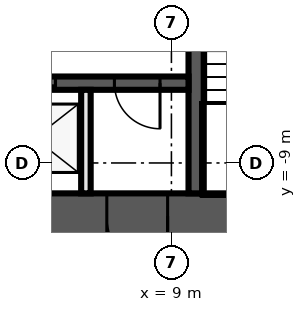
"""IFC4 building model, lengths in metres.
Left out: names, types, materials, properties, quantities, classifications, styles, units other than length and angle.
Written with IfcOpenShell. Run it as: python <this file> out.ifc"""

import sys

from ifc_helpers import new_model, si_unit, direction, frame, frame_2d, origin, place, context, subcontext, project, spatial, rectangle, extrude, element, fill, save


model = new_model("IFC4")
c1 = context("Model", 3, precision=1e-05, world=origin(), true_north=direction((0.0, 1.0)))
c2 = subcontext(c1, "Body", "Model", "MODEL_VIEW")
j1 = project(units=[si_unit("LENGTHUNIT", "METRE"), si_unit("PLANEANGLEUNIT", "RADIAN")], contexts=[c1])
p1 = place(None, origin())
s1 = spatial("IfcSite", under=j1, at=p1, CompositionType="ELEMENT")
p2 = place(p1, origin())
s2 = spatial("IfcBuilding", under=s1, at=p2, CompositionType="ELEMENT")
p3 = place(p2, origin())
s3 = spatial("IfcBuildingStorey", under=s2, at=p3, CompositionType="ELEMENT", Elevation=0.0)
p4 = place(p3, frame((14.0, -10.4, 0.0), z_axis=(0.0, 0.0, 1.0), x_axis=(-1.0, 0.0, 0.0)))
e1 = element("IfcWall", 1, at=p4, inside=s3, PredefinedType="SHEAR", context=c2, shape_type="SweptSolid", body=[
    extrude(rectangle(XDim=28.0, YDim=1.2, at=frame_2d((14.0, 0.0))), origin(), (0.0, 0.0, 1.0), 8.55),
])
p5 = place(p4, frame((5.1, 0.0, 0.0)))
e2 = element("IfcOpeningElement", 2, at=p5, cuts=e1, PredefinedType="OPENING", context=c2, shape_type="SweptSolid", body=[
    extrude(rectangle(XDim=1.6, YDim=2.1, at=frame_2d((0.8, 1.05))), frame((0.0, 0.61, 0.0), z_axis=(0.0, -1.0, 0.0), x_axis=(1.0, 0.0, 0.0)), (0.0, 0.0, 1.0), 1.22),
])
p6 = place(p3, frame((9.65, -2.3, 0.0), z_axis=(0.0, 0.0, 1.0), x_axis=(0.0, -1.0, 0.0)))
e3 = element("IfcWall", 3, at=p6, inside=s3, PredefinedType="SHEAR", context=c2, shape_type="SweptSolid", body=[
    extrude(rectangle(XDim=7.5, YDim=0.4, at=frame_2d((3.75, 0.0))), origin(), (0.0, 0.0, 1.0), 8.55),
])
p7 = place(p6, frame((1.2, 0.0, 0.0)))
e4 = element("IfcOpeningElement", 4, at=p7, cuts=e3, PredefinedType="OPENING", context=c2, shape_type="SweptSolid", body=[
    extrude(rectangle(XDim=1.2, YDim=2.1, at=frame_2d((0.6, 1.05))), frame((0.0, 0.21, 0.0), z_axis=(0.0, -1.0, 0.0), x_axis=(1.0, 0.0, 0.0)), (0.0, 0.0, 1.0), 0.42),
])
p8 = place(p3, frame((9.45, -6.9, 0.0), z_axis=(0.0, 0.0, 1.0), x_axis=(-1.0, 0.0, 0.0)))
e5 = element("IfcWall", 5, at=p8, inside=s3, PredefinedType="SHEAR", context=c2, shape_type="SweptSolid", body=[
    extrude(rectangle(XDim=18.9, YDim=0.35, at=frame_2d((9.45, 0.0))), origin(), (0.0, 0.0, 1.0), 8.55),
])
p9 = place(p8, frame((6.2, 0.0, 0.0)))
e6 = element("IfcOpeningElement", 6, at=p9, cuts=e5, PredefinedType="OPENING", context=c2, shape_type="SweptSolid", body=[
    extrude(rectangle(XDim=1.1, YDim=2.1, at=frame_2d((0.55, 1.05))), frame((0.0, 0.185, 0.0), z_axis=(0.0, -1.0, 0.0), x_axis=(1.0, 0.0, 0.0)), (0.0, 0.0, 1.0), 0.37),
])
p10 = place(p8, frame((3.5, 0.0, 0.0)))
e7 = element("IfcOpeningElement", 7, at=p10, cuts=e5, PredefinedType="OPENING", context=c2, shape_type="SweptSolid", body=[
    extrude(rectangle(XDim=1.1, YDim=2.1, at=frame_2d((0.55, 1.05))), frame((0.0, 0.185, 0.0), z_axis=(0.0, -1.0, 0.0), x_axis=(1.0, 0.0, 0.0)), (0.0, 0.0, 1.0), 0.37),
])
p11 = place(p8, frame((0.75, 0.0, 0.0)))
e8 = element("IfcOpeningElement", 8, at=p11, cuts=e5, PredefinedType="OPENING", context=c2, shape_type="SweptSolid", body=[
    extrude(rectangle(XDim=1.2, YDim=2.1, at=frame_2d((0.6, 1.05))), frame((0.0, 0.185, 0.0), z_axis=(0.0, -1.0, 0.0), x_axis=(1.0, 0.0, 0.0)), (0.0, 0.0, 1.0), 0.37),
])
p12 = place(p8, frame((17.1, 0.0, 0.0)))
e9 = element("IfcOpeningElement", 9, at=p12, cuts=e5, PredefinedType="OPENING", context=c2, shape_type="SweptSolid", body=[
    extrude(rectangle(XDim=0.9, YDim=2.1, at=frame_2d((0.45, 1.05))), frame((0.0, 0.185, 0.0), z_axis=(0.0, -1.0, 0.0), x_axis=(1.0, 0.0, 0.0)), (0.0, 0.0, 1.0), 0.37),
])
p13 = place(p8, frame((13.05, 0.0, 0.0)))
e10 = element("IfcOpeningElement", 10, at=p13, cuts=e5, PredefinedType="OPENING", context=c2, shape_type="SweptSolid", body=[
    extrude(rectangle(XDim=0.9, YDim=2.1, at=frame_2d((0.45, 1.05))), frame((0.0, 0.185, 0.0), z_axis=(0.0, -1.0, 0.0), x_axis=(1.0, 0.0, 0.0)), (0.0, 0.0, 1.0), 0.37),
])
p14 = place(p8, frame((9.0, 0.0, 0.0)))
e11 = element("IfcOpeningElement", 11, at=p14, cuts=e5, PredefinedType="OPENING", context=c2, shape_type="SweptSolid", body=[
    extrude(rectangle(XDim=0.9, YDim=2.1, at=frame_2d((0.45, 1.05))), frame((0.0, 0.185, 0.0), z_axis=(0.0, -1.0, 0.0), x_axis=(1.0, 0.0, 0.0)), (0.0, 0.0, 1.0), 0.37),
])
p15 = place(p3, frame((6.75, -9.8, 0.0), z_axis=(0.0, 0.0, 1.0), x_axis=(0.0, 1.0, 0.0)))
e12 = element("IfcWall", 12, at=p15, inside=s3, PredefinedType="SOLIDWALL", context=c2, shape_type="SweptSolid", body=[
    extrude(rectangle(XDim=2.725, YDim=0.25, at=frame_2d((1.363, 0.0))), origin(), (0.0, 0.0, 1.0), 8.55),
])
p16 = place(p10, origin())
e13 = element("IfcDoor", 13, at=p16, inside=s3, OperationType="DOUBLE_DOOR_SLIDING", PredefinedType="DOOR", context=c2, shape_type="SweptSolid", body=[
    extrude(rectangle(XDim=1.1, YDim=2.1, at=frame_2d((0.55, 1.05))), frame((0.0, 0.025, 0.0), z_axis=(0.0, -1.0, 0.0), x_axis=(1.0, 0.0, 0.0)), (0.0, 0.0, 1.0), 0.05),
])
fill(e7, e13)
p17 = place(p5, origin())
e14 = element("IfcDoor", 14, at=p17, inside=s3, OperationType="DOUBLE_DOOR_SINGLE_SWING", PredefinedType="DOOR", context=c2, shape_type="SweptSolid", body=[
    extrude(rectangle(XDim=1.6, YDim=2.1, at=frame_2d((0.8, 1.05))), frame((0.0, 0.025, 0.0), z_axis=(0.0, -1.0, 0.0), x_axis=(1.0, 0.0, 0.0)), (0.0, 0.0, 1.0), 0.05),
])
fill(e2, e14)
p18 = place(p11, origin())
e15 = element("IfcDoor", 15, at=p18, inside=s3, OperationType="SINGLE_SWING_LEFT", PredefinedType="DOOR", context=c2, shape_type="SweptSolid", body=[
    extrude(rectangle(XDim=1.2, YDim=2.1, at=frame_2d((0.6, 1.05))), frame((0.0, 0.025, 0.0), z_axis=(0.0, -1.0, 0.0), x_axis=(1.0, 0.0, 0.0)), (0.0, 0.0, 1.0), 0.05),
])
fill(e8, e15)
save(model, sys.argv[1])
